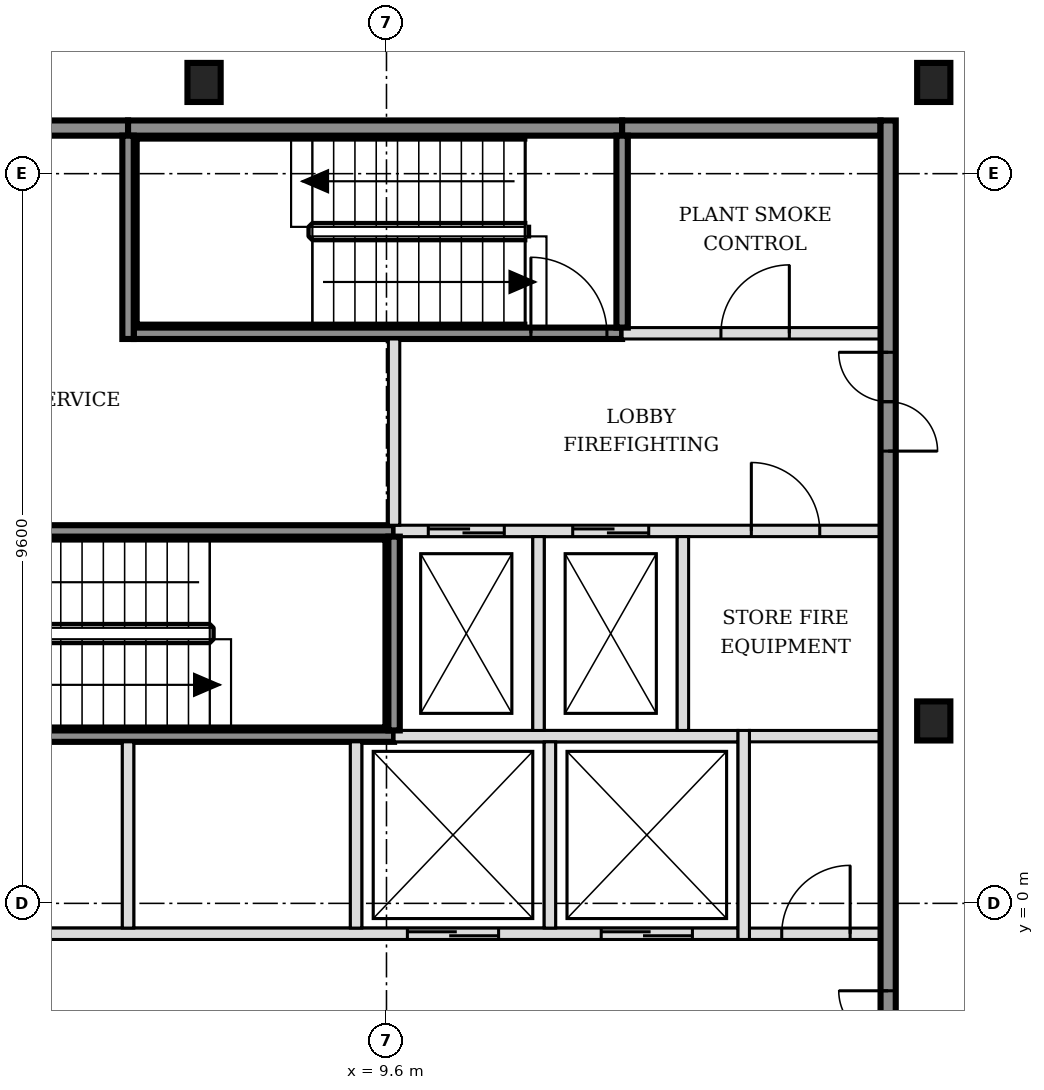
"""IFC4 building model, lengths in metres.
Left out: names, types, materials, properties, quantities, classifications, styles, units other than length and angle.
Written with IfcOpenShell. Run it as: python <this file> out.ifc"""

import sys

from ifc_helpers import new_model, si_unit, direction, frame, frame_2d, origin, origin_2d, place, context, subcontext, project, spatial, rectangle, i_section, extrude, element, fill, save


model = new_model("IFC4")
c1 = context("Model", 3, precision=1e-05, world=origin(), true_north=direction((0.0, 1.0)))
c2 = subcontext(c1, "Body", "Model", "MODEL_VIEW")
j1 = project(units=[si_unit("LENGTHUNIT", "METRE"), si_unit("PLANEANGLEUNIT", "RADIAN")], contexts=[c1])
p1 = place(None, origin())
s1 = spatial("IfcSite", under=j1, at=p1, CompositionType="ELEMENT")
p2 = place(p1, origin())
s2 = spatial("IfcBuilding", under=s1, at=p2, CompositionType="ELEMENT")
p3 = place(p2, frame((0.0, 0.0, 97.8)))
s3 = spatial("IfcBuildingStorey", under=s2, at=p3, CompositionType="ELEMENT", Elevation=97.8)
for number, where, z_axis, x_axis in (
    (1, (16.8, 2.4, -0.15), (0.0, 0.0, 1.0), (1.0, 0.0, 0.0)),
    (2, (7.2, 10.8, -0.15), (0.0, 0.0, 1.0), (1.0, 0.0, 0.0)),
    (3, (16.8, 10.8, -0.15), (0.0, 0.0, 1.0), (1.0, 0.0, 0.0)),
):
    element("IfcColumn", number, at=place(p3, frame(where, z_axis=z_axis, x_axis=x_axis)), inside=s3, PredefinedType="COLUMN", context=c2, shape_type="SweptSolid", body=[
        extrude(i_section(OverallWidth=0.437, OverallDepth=0.514, WebThickness=0.061, FlangeThickness=0.097, FilletRadius=0.015, at=origin_2d()), origin(), (0.0, 0.0, 1.0), 3.6),
    ])
p4 = place(p3, frame((-1.7, -0.4, 0.0), z_axis=(0.0, 0.0, 1.0), x_axis=(1.0, 0.0, 0.0)))
e4 = element("IfcWall", 4, at=p4, inside=s3, PredefinedType="SOLIDWALL", context=c2, shape_type="SweptSolid", body=[
    extrude(rectangle(XDim=15.925, YDim=0.15, at=frame_2d((7.962, 0.0))), origin(), (0.0, 0.0, 1.0), 3.45),
])
p5 = place(p4, frame((0.6, 0.0, 0.0)))
e5 = element("IfcOpeningElement", 5, at=p5, cuts=e4, PredefinedType="OPENING", context=c2, shape_type="SweptSolid", body=[
    extrude(rectangle(XDim=1.1, YDim=2.1, at=frame_2d((0.55, 1.05))), frame((0.0, 0.085, 0.0), z_axis=(0.0, -1.0, 0.0), x_axis=(1.0, 0.0, 0.0)), (0.0, 0.0, 1.0), 0.17),
])
p6 = place(p4, frame((3.1, 0.0, 0.0)))
e6 = element("IfcOpeningElement", 6, at=p6, cuts=e4, PredefinedType="OPENING", context=c2, shape_type="SweptSolid", body=[
    extrude(rectangle(XDim=1.1, YDim=2.1, at=frame_2d((0.55, 1.05))), frame((0.0, 0.085, 0.0), z_axis=(0.0, -1.0, 0.0), x_axis=(1.0, 0.0, 0.0)), (0.0, 0.0, 1.0), 0.17),
])
p7 = place(p4, frame((11.575, 0.0, 0.0)))
e7 = element("IfcOpeningElement", 7, at=p7, cuts=e4, PredefinedType="OPENING", context=c2, shape_type="SweptSolid", body=[
    extrude(rectangle(XDim=1.2, YDim=2.1, at=frame_2d((0.6, 1.05))), frame((0.0, 0.085, 0.0), z_axis=(0.0, -1.0, 0.0), x_axis=(1.0, 0.0, 0.0)), (0.0, 0.0, 1.0), 0.17),
])
p8 = place(p4, frame((14.125, 0.0, 0.0)))
e8 = element("IfcOpeningElement", 8, at=p8, cuts=e4, PredefinedType="OPENING", context=c2, shape_type="SweptSolid", body=[
    extrude(rectangle(XDim=1.2, YDim=2.1, at=frame_2d((0.6, 1.05))), frame((0.0, 0.085, 0.0), z_axis=(0.0, -1.0, 0.0), x_axis=(1.0, 0.0, 0.0)), (0.0, 0.0, 1.0), 0.17),
])
p9 = place(p3, frame((14.375, -0.4, 0.0), z_axis=(0.0, 0.0, 1.0), x_axis=(1.0, 0.0, 0.0)))
e9 = element("IfcWall", 9, at=p9, inside=s3, PredefinedType="PARTITIONING", context=c2, shape_type="SweptSolid", body=[
    extrude(rectangle(XDim=1.725, YDim=0.15, at=frame_2d((0.863, 0.0))), origin(), (0.0, 0.0, 1.0), 3.45),
])
p10 = place(p9, frame((0.425, 0.0, 0.0)))
e10 = element("IfcOpeningElement", 10, at=p10, cuts=e9, PredefinedType="OPENING", context=c2, shape_type="SweptSolid", body=[
    extrude(rectangle(XDim=0.9, YDim=2.1, at=frame_2d((0.45, 1.05))), frame((0.0, 0.085, 0.0), z_axis=(0.0, -1.0, 0.0), x_axis=(1.0, 0.0, 0.0)), (0.0, 0.0, 1.0), 0.17),
])
p11 = place(p3, frame((3.2, 2.2, 0.0), z_axis=(0.0, 0.0, 1.0), x_axis=(1.0, 0.0, 0.0)))
e11 = element("IfcWall", 11, at=p11, inside=s3, PredefinedType="SOLIDWALL", context=c2, shape_type="SweptSolid", body=[
    extrude(rectangle(XDim=6.5, YDim=0.15, at=frame_2d((3.25, 0.0))), origin(), (0.0, 0.0, 1.0), 3.45),
])
p12 = place(p3, frame((9.7, 2.2, 0.0), z_axis=(0.0, 0.0, 1.0), x_axis=(1.0, 0.0, 0.0)))
e12 = element("IfcWall", 12, at=p12, inside=s3, PredefinedType="SOLIDWALL", context=c2, shape_type="SweptSolid", body=[
    extrude(rectangle(XDim=4.525, YDim=0.15, at=frame_2d((2.263, 0.0))), origin(), (0.0, 0.0, 1.0), 3.45),
])
p13 = place(p3, frame((14.375, 2.2, 0.0), z_axis=(0.0, 0.0, 1.0), x_axis=(1.0, 0.0, 0.0)))
e13 = element("IfcWall", 13, at=p13, inside=s3, PredefinedType="PARTITIONING", context=c2, shape_type="SweptSolid", body=[
    extrude(rectangle(XDim=1.725, YDim=0.15, at=frame_2d((0.863, 0.0))), origin(), (0.0, 0.0, 1.0), 3.45),
])
p14 = place(p3, frame((3.275, 4.9, 0.0), z_axis=(0.0, 0.0, 1.0), x_axis=(1.0, 0.0, 0.0)))
e14 = element("IfcWall", 14, at=p14, inside=s3, PredefinedType="SOLIDWALL", context=c2, shape_type="SweptSolid", body=[
    extrude(rectangle(XDim=6.425, YDim=0.15, at=frame_2d((3.212, 0.0))), origin(), (0.0, 0.0, 1.0), 3.45),
])
p15 = place(p14, frame((0.1, 0.0, 0.0)))
e15 = element("IfcOpeningElement", 15, at=p15, cuts=e14, PredefinedType="OPENING", context=c2, shape_type="SweptSolid", body=[
    extrude(rectangle(XDim=1.0, YDim=2.1, at=frame_2d((0.5, 1.05))), frame((0.0, 0.085, 0.0), z_axis=(0.0, -1.0, 0.0), x_axis=(1.0, 0.0, 0.0)), (0.0, 0.0, 1.0), 0.17),
])
p16 = place(p3, frame((9.7, 4.9, 0.0), z_axis=(0.0, 0.0, 1.0), x_axis=(1.0, 0.0, 0.0)))
e16 = element("IfcWall", 16, at=p16, inside=s3, PredefinedType="SOLIDWALL", context=c2, shape_type="SweptSolid", body=[
    extrude(rectangle(XDim=6.4, YDim=0.15, at=frame_2d((3.2, 0.0))), origin(), (0.0, 0.0, 1.0), 3.45),
])
p17 = place(p16, frame((0.45, 0.0, 0.0)))
e17 = element("IfcOpeningElement", 17, at=p17, cuts=e16, PredefinedType="OPENING", context=c2, shape_type="SweptSolid", body=[
    extrude(rectangle(XDim=1.0, YDim=2.1, at=frame_2d((0.5, 1.05))), frame((0.0, 0.085, 0.0), z_axis=(0.0, -1.0, 0.0), x_axis=(1.0, 0.0, 0.0)), (0.0, 0.0, 1.0), 0.17),
])
p18 = place(p16, frame((2.35, 0.0, 0.0)))
e18 = element("IfcOpeningElement", 18, at=p18, cuts=e16, PredefinedType="OPENING", context=c2, shape_type="SweptSolid", body=[
    extrude(rectangle(XDim=1.0, YDim=2.1, at=frame_2d((0.5, 1.05))), frame((0.0, 0.085, 0.0), z_axis=(0.0, -1.0, 0.0), x_axis=(1.0, 0.0, 0.0)), (0.0, 0.0, 1.0), 0.17),
])
p19 = place(p16, frame((4.7, 0.0, 0.0)))
e19 = element("IfcOpeningElement", 19, at=p19, cuts=e16, PredefinedType="OPENING", context=c2, shape_type="SweptSolid", body=[
    extrude(rectangle(XDim=0.9, YDim=2.1, at=frame_2d((0.45, 1.05))), frame((0.0, 0.085, 0.0), z_axis=(0.0, -1.0, 0.0), x_axis=(1.0, 0.0, 0.0)), (0.0, 0.0, 1.0), 0.17),
])
p20 = place(p3, frame((6.275, 7.5, 0.0), z_axis=(0.0, 0.0, 1.0), x_axis=(1.0, 0.0, 0.0)))
e20 = element("IfcWall", 20, at=p20, inside=s3, PredefinedType="SOLIDWALL", context=c2, shape_type="SweptSolid", body=[
    extrude(rectangle(XDim=6.425, YDim=0.15, at=frame_2d((3.212, 0.0))), origin(), (0.0, 0.0, 1.0), 3.45),
])
p21 = place(p20, frame((5.225, 0.0, 0.0)))
e21 = element("IfcOpeningElement", 21, at=p21, cuts=e20, PredefinedType="OPENING", context=c2, shape_type="SweptSolid", body=[
    extrude(rectangle(XDim=1.0, YDim=2.1, at=frame_2d((0.5, 1.05))), frame((0.0, 0.085, 0.0), z_axis=(0.0, -1.0, 0.0), x_axis=(1.0, 0.0, 0.0)), (0.0, 0.0, 1.0), 0.17),
])
p22 = place(p3, frame((12.7, 7.5, 0.0), z_axis=(0.0, 0.0, 1.0), x_axis=(1.0, 0.0, 0.0)))
e22 = element("IfcWall", 22, at=p22, inside=s3, PredefinedType="SOLIDWALL", context=c2, shape_type="SweptSolid", body=[
    extrude(rectangle(XDim=3.4, YDim=0.15, at=frame_2d((1.7, 0.0))), origin(), (0.0, 0.0, 1.0), 3.45),
])
p23 = place(p22, frame((1.3, 0.0, 0.0)))
e23 = element("IfcOpeningElement", 23, at=p23, cuts=e22, PredefinedType="OPENING", context=c2, shape_type="SweptSolid", body=[
    extrude(rectangle(XDim=0.9, YDim=2.1, at=frame_2d((0.45, 1.05))), frame((0.0, 0.085, 0.0), z_axis=(0.0, -1.0, 0.0), x_axis=(1.0, 0.0, 0.0)), (0.0, 0.0, 1.0), 0.17),
])
p24 = place(p3, frame((-1.7, 10.2, 0.0), z_axis=(0.0, 0.0, 1.0), x_axis=(1.0, 0.0, 0.0)))
e24 = element("IfcWall", 24, at=p24, inside=s3, PredefinedType="SOLIDWALL", context=c2, shape_type="SweptSolid", body=[
    extrude(rectangle(XDim=7.9, YDim=0.2, at=frame_2d((3.95, 0.0))), origin(), (0.0, 0.0, 1.0), 3.45),
])
p25 = place(p3, frame((6.2, 10.2, 0.0), z_axis=(0.0, 0.0, 1.0), x_axis=(1.0, 0.0, 0.0)))
e25 = element("IfcWall", 25, at=p25, inside=s3, PredefinedType="SOLIDWALL", context=c2, shape_type="SweptSolid", body=[
    extrude(rectangle(XDim=6.5, YDim=0.2, at=frame_2d((3.25, 0.0))), origin(), (0.0, 0.0, 1.0), 3.45),
])
p26 = place(p3, frame((12.7, 10.2, 0.0), z_axis=(0.0, 0.0, 1.0), x_axis=(1.0, 0.0, 0.0)))
e26 = element("IfcWall", 26, at=p26, inside=s3, PredefinedType="SOLIDWALL", context=c2, shape_type="SweptSolid", body=[
    extrude(rectangle(XDim=3.4, YDim=0.2, at=frame_2d((1.7, 0.0))), origin(), (0.0, 0.0, 1.0), 3.45),
])
p27 = place(p3, frame((6.2, -0.325, 0.0), z_axis=(0.0, 0.0, 1.0), x_axis=(0.0, 1.0, 0.0)))
e27 = element("IfcWall", 27, at=p27, inside=s3, PredefinedType="SOLIDWALL", context=c2, shape_type="SweptSolid", body=[
    extrude(rectangle(XDim=2.45, YDim=0.15, at=frame_2d((1.225, 0.0))), origin(), (0.0, 0.0, 1.0), 3.45),
])
p28 = place(p3, frame((6.2, 7.425, 0.0), z_axis=(0.0, 0.0, 1.0), x_axis=(0.0, 1.0, 0.0)))
e28 = element("IfcWall", 28, at=p28, inside=s3, PredefinedType="SOLIDWALL", context=c2, shape_type="SweptSolid", body=[
    extrude(rectangle(XDim=2.675, YDim=0.15, at=frame_2d((1.337, 0.0))), origin(), (0.0, 0.0, 1.0), 3.45),
])
p29 = place(p3, frame((9.2, -0.325, 0.0), z_axis=(0.0, 0.0, 1.0), x_axis=(0.0, 1.0, 0.0)))
e29 = element("IfcWall", 29, at=p29, inside=s3, PredefinedType="SOLIDWALL", context=c2, shape_type="SweptSolid", body=[
    extrude(rectangle(XDim=2.45, YDim=0.15, at=frame_2d((1.225, 0.0))), origin(), (0.0, 0.0, 1.0), 3.45),
])
p30 = place(p3, frame((9.7, 2.275, 0.0), z_axis=(0.0, 0.0, 1.0), x_axis=(0.0, 1.0, 0.0)))
e30 = element("IfcWall", 30, at=p30, inside=s3, PredefinedType="SOLIDWALL", context=c2, shape_type="SweptSolid", body=[
    extrude(rectangle(XDim=2.55, YDim=0.15, at=frame_2d((1.275, 0.0))), origin(), (0.0, 0.0, 1.0), 3.45),
])
p31 = place(p3, frame((9.7, 4.975, 0.0), z_axis=(0.0, 0.0, 1.0), x_axis=(0.0, 1.0, 0.0)))
e31 = element("IfcWall", 31, at=p31, inside=s3, PredefinedType="SOLIDWALL", context=c2, shape_type="SweptSolid", body=[
    extrude(rectangle(XDim=2.45, YDim=0.15, at=frame_2d((1.225, 0.0))), origin(), (0.0, 0.0, 1.0), 3.45),
])
p32 = place(p3, frame((11.6, 2.275, 0.0), z_axis=(0.0, 0.0, 1.0), x_axis=(0.0, 1.0, 0.0)))
e32 = element("IfcWall", 32, at=p32, inside=s3, PredefinedType="SOLIDWALL", context=c2, shape_type="SweptSolid", body=[
    extrude(rectangle(XDim=2.55, YDim=0.15, at=frame_2d((1.275, 0.0))), origin(), (0.0, 0.0, 1.0), 3.45),
])
p33 = place(p3, frame((11.75, -0.325, 0.0), z_axis=(0.0, 0.0, 1.0), x_axis=(0.0, 1.0, 0.0)))
e33 = element("IfcWall", 33, at=p33, inside=s3, PredefinedType="SOLIDWALL", context=c2, shape_type="SweptSolid", body=[
    extrude(rectangle(XDim=2.45, YDim=0.15, at=frame_2d((1.225, 0.0))), origin(), (0.0, 0.0, 1.0), 3.45),
])
p34 = place(p3, frame((12.7, 7.575, 0.0), z_axis=(0.0, 0.0, 1.0), x_axis=(0.0, 1.0, 0.0)))
e34 = element("IfcWall", 34, at=p34, inside=s3, PredefinedType="SOLIDWALL", context=c2, shape_type="SweptSolid", body=[
    extrude(rectangle(XDim=2.525, YDim=0.15, at=frame_2d((1.263, 0.0))), origin(), (0.0, 0.0, 1.0), 3.45),
])
p35 = place(p3, frame((13.5, 2.275, 0.0), z_axis=(0.0, 0.0, 1.0), x_axis=(0.0, 1.0, 0.0)))
e35 = element("IfcWall", 35, at=p35, inside=s3, PredefinedType="SOLIDWALL", context=c2, shape_type="SweptSolid", body=[
    extrude(rectangle(XDim=2.55, YDim=0.15, at=frame_2d((1.275, 0.0))), origin(), (0.0, 0.0, 1.0), 3.45),
])
p36 = place(p3, frame((14.3, -0.475, 0.0), z_axis=(0.0, 0.0, 1.0), x_axis=(0.0, 1.0, 0.0)))
e36 = element("IfcWall", 36, at=p36, inside=s3, PredefinedType="SOLIDWALL", context=c2, shape_type="SweptSolid", body=[
    extrude(rectangle(XDim=2.75, YDim=0.15, at=frame_2d((1.375, 0.0))), origin(), (0.0, 0.0, 1.0), 3.45),
])
p37 = place(p3, frame((16.2, -5.5, 0.0), z_axis=(0.0, 0.0, 1.0), x_axis=(0.0, 1.0, 0.0)))
e37 = element("IfcWall", 37, at=p37, inside=s3, PredefinedType="SOLIDWALL", context=c2, shape_type="SweptSolid", body=[
    extrude(rectangle(XDim=15.8, YDim=0.2, at=frame_2d((7.9, 0.0))), origin(), (0.0, 0.0, 1.0), 3.45),
])
p38 = place(p37, frame((3.05, 0.0, 0.0)))
e38 = element("IfcOpeningElement", 38, at=p38, cuts=e37, PredefinedType="OPENING", context=c2, shape_type="SweptSolid", body=[
    extrude(rectangle(XDim=1.3, YDim=2.1, at=frame_2d((0.65, 1.05))), frame((0.0, 0.11, 0.0), z_axis=(0.0, -1.0, 0.0), x_axis=(1.0, 0.0, 0.0)), (0.0, 0.0, 1.0), 0.22),
])
p39 = place(p37, frame((11.45, 0.0, 0.0)))
e39 = element("IfcOpeningElement", 39, at=p39, cuts=e37, PredefinedType="OPENING", context=c2, shape_type="SweptSolid", body=[
    extrude(rectangle(XDim=1.3, YDim=2.1, at=frame_2d((0.65, 1.05))), frame((0.0, 0.11, 0.0), z_axis=(0.0, -1.0, 0.0), x_axis=(1.0, 0.0, 0.0)), (0.0, 0.0, 1.0), 0.22),
])
p40 = place(p7, origin())
e40 = element("IfcDoor", 40, at=p40, inside=s3, OperationType="DOUBLE_DOOR_SLIDING", PredefinedType="DOOR", context=c2, shape_type="SweptSolid", body=[
    extrude(rectangle(XDim=1.2, YDim=2.1, at=frame_2d((0.6, 1.05))), frame((0.0, 0.025, 0.0), z_axis=(0.0, -1.0, 0.0), x_axis=(1.0, 0.0, 0.0)), (0.0, 0.0, 1.0), 0.05),
])
fill(e7, e40)
p41 = place(p8, origin())
e41 = element("IfcDoor", 41, at=p41, inside=s3, OperationType="DOUBLE_DOOR_SLIDING", PredefinedType="DOOR", context=c2, shape_type="SweptSolid", body=[
    extrude(rectangle(XDim=1.2, YDim=2.1, at=frame_2d((0.6, 1.05))), frame((0.0, 0.025, 0.0), z_axis=(0.0, -1.0, 0.0), x_axis=(1.0, 0.0, 0.0)), (0.0, 0.0, 1.0), 0.05),
])
fill(e8, e41)
p42 = place(p17, origin())
e42 = element("IfcDoor", 42, at=p42, inside=s3, OperationType="DOUBLE_DOOR_SLIDING", PredefinedType="DOOR", context=c2, shape_type="SweptSolid", body=[
    extrude(rectangle(XDim=1.0, YDim=2.1, at=frame_2d((0.5, 1.05))), frame((0.0, 0.025, 0.0), z_axis=(0.0, -1.0, 0.0), x_axis=(1.0, 0.0, 0.0)), (0.0, 0.0, 1.0), 0.05),
])
fill(e17, e42)
p43 = place(p18, origin())
e43 = element("IfcDoor", 43, at=p43, inside=s3, OperationType="DOUBLE_DOOR_SLIDING", PredefinedType="DOOR", context=c2, shape_type="SweptSolid", body=[
    extrude(rectangle(XDim=1.0, YDim=2.1, at=frame_2d((0.5, 1.05))), frame((0.0, 0.025, 0.0), z_axis=(0.0, -1.0, 0.0), x_axis=(1.0, 0.0, 0.0)), (0.0, 0.0, 1.0), 0.05),
])
fill(e18, e43)
p44 = place(p21, origin())
e44 = element("IfcDoor", 44, at=p44, inside=s3, OperationType="SINGLE_SWING_LEFT", PredefinedType="DOOR", context=c2, shape_type="SweptSolid", body=[
    extrude(rectangle(XDim=1.0, YDim=2.1, at=frame_2d((0.5, 1.05))), frame((0.0, 0.025, 0.0), z_axis=(0.0, -1.0, 0.0), x_axis=(1.0, 0.0, 0.0)), (0.0, 0.0, 1.0), 0.05),
])
fill(e21, e44)
p45 = place(p38, origin())
e45 = element("IfcDoor", 45, at=p45, inside=s3, OperationType="DOUBLE_DOOR_SINGLE_SWING", PredefinedType="DOOR", context=c2, shape_type="SweptSolid", body=[
    extrude(rectangle(XDim=1.3, YDim=2.1, at=frame_2d((0.65, 1.05))), frame((0.0, 0.025, 0.0), z_axis=(0.0, -1.0, 0.0), x_axis=(1.0, 0.0, 0.0)), (0.0, 0.0, 1.0), 0.05),
])
fill(e38, e45)
p46 = place(p39, origin())
e46 = element("IfcDoor", 46, at=p46, inside=s3, OperationType="DOUBLE_DOOR_SINGLE_SWING", PredefinedType="DOOR", context=c2, shape_type="SweptSolid", body=[
    extrude(rectangle(XDim=1.3, YDim=2.1, at=frame_2d((0.65, 1.05))), frame((0.0, 0.025, 0.0), z_axis=(0.0, -1.0, 0.0), x_axis=(1.0, 0.0, 0.0)), (0.0, 0.0, 1.0), 0.05),
])
fill(e39, e46)
p47 = place(p10, origin())
e47 = element("IfcDoor", 47, at=p47, inside=s3, OperationType="SINGLE_SWING_RIGHT", PredefinedType="DOOR", context=c2, shape_type="SweptSolid", body=[
    extrude(rectangle(XDim=0.9, YDim=2.1, at=frame_2d((0.45, 1.05))), frame((0.0, 0.025, 0.0), z_axis=(0.0, -1.0, 0.0), x_axis=(1.0, 0.0, 0.0)), (0.0, 0.0, 1.0), 0.05),
])
fill(e10, e47)
p48 = place(p19, origin())
e48 = element("IfcDoor", 48, at=p48, inside=s3, OperationType="SINGLE_SWING_LEFT", PredefinedType="DOOR", context=c2, shape_type="SweptSolid", body=[
    extrude(rectangle(XDim=0.9, YDim=2.1, at=frame_2d((0.45, 1.05))), frame((0.0, 0.025, 0.0), z_axis=(0.0, -1.0, 0.0), x_axis=(1.0, 0.0, 0.0)), (0.0, 0.0, 1.0), 0.05),
])
fill(e19, e48)
p49 = place(p23, origin())
e49 = element("IfcDoor", 49, at=p49, inside=s3, OperationType="SINGLE_SWING_RIGHT", PredefinedType="DOOR", context=c2, shape_type="SweptSolid", body=[
    extrude(rectangle(XDim=0.9, YDim=2.1, at=frame_2d((0.45, 1.05))), frame((0.0, 0.025, 0.0), z_axis=(0.0, -1.0, 0.0), x_axis=(1.0, 0.0, 0.0)), (0.0, 0.0, 1.0), 0.05),
])
fill(e23, e49)
save(model, sys.argv[1])
